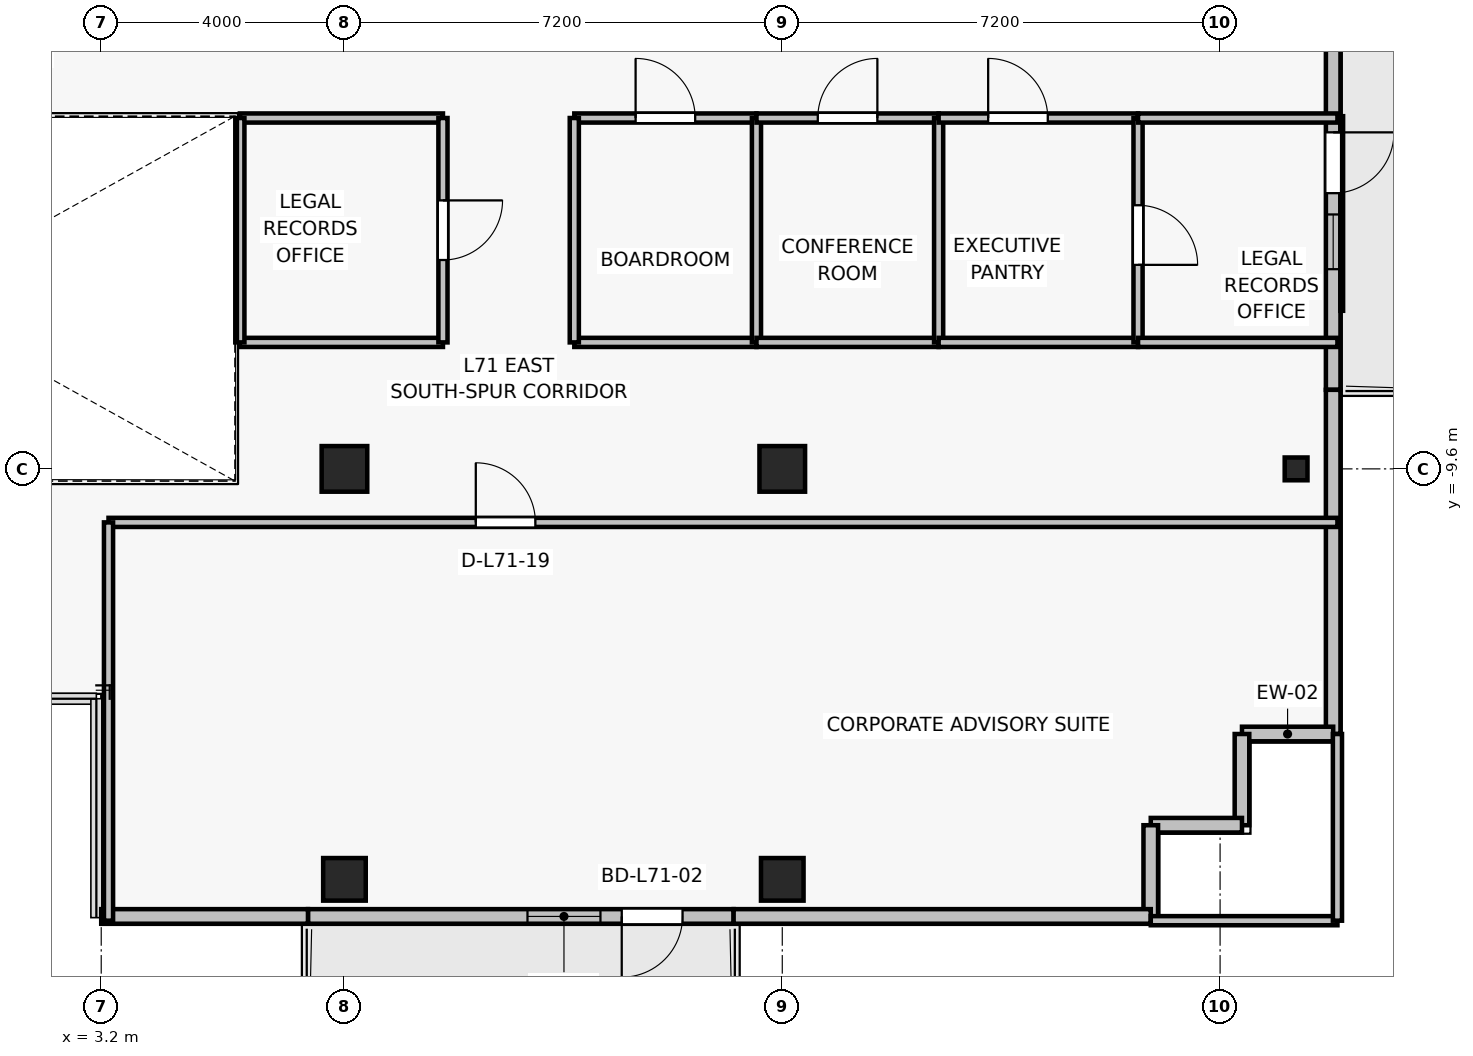
"""IFC4 building model, lengths in metres.
Left out: names, types, materials, properties, quantities, classifications, styles, units other than length and angle.
Written with IfcOpenShell. Run it as: python <this file> out.ifc"""

import sys

from ifc_helpers import new_model, si_unit, direction, frame, frame_2d, origin, origin_2d, place, context, subcontext, project, spatial, rectangle, i_section, extrude, source, transform, mapped, element, fill, save


model = new_model("IFC4")
c1 = context("Model", 3, precision=1e-05, world=origin(), true_north=direction((0.0, 1.0)))
c2 = subcontext(c1, "Body", "Model", "MODEL_VIEW")
j1 = project(units=[si_unit("LENGTHUNIT", "METRE"), si_unit("PLANEANGLEUNIT", "RADIAN")], contexts=[c1])
p1 = place(None, origin())
s1 = spatial("IfcSite", under=j1, at=p1, CompositionType="ELEMENT")
p2 = place(p1, origin())
s2 = spatial("IfcBuilding", under=s1, at=p2, CompositionType="ELEMENT")
p3 = place(p2, frame((0.0, 0.0, 251.8)))
s3 = spatial("IfcBuildingStorey", under=s2, at=p3, CompositionType="ELEMENT", Elevation=251.8)
for number, where, z_axis, x_axis in (
    (1, (7.2, -9.6, 0.0), (0.0, 0.0, 1.0), (1.0, 0.0, 0.0)),
    (2, (14.4, -9.6, 0.0), (0.0, 0.0, 1.0), (1.0, 0.0, 0.0)),
):
    element("IfcColumn", number, at=place(p3, frame(where, z_axis=z_axis, x_axis=x_axis)), inside=s3, PredefinedType="COLUMN", context=c2, shape_type="SweptSolid", body=[
        extrude(rectangle(XDim=0.75, YDim=0.75, at=origin_2d()), origin(), (0.0, 0.0, 1.0), 3.3),
    ])
for number, where, z_axis, x_axis in (
    (3, (7.2, -16.35, 0.0), (0.0, 0.0, 1.0), (1.0, 0.0, 0.0)),
    (4, (14.4, -16.35, 0.0), (0.0, 0.0, 1.0), (1.0, 0.0, 0.0)),
):
    element("IfcColumn", number, at=place(p3, frame(where, z_axis=z_axis, x_axis=x_axis)), inside=s3, PredefinedType="COLUMN", context=c2, shape_type="SweptSolid", body=[
        extrude(rectangle(XDim=0.7, YDim=0.7, at=origin_2d()), origin(), (0.0, 0.0, 1.0), 3.3),
    ])
p4 = place(p3, frame((22.85, -9.6, 0.0), z_axis=(0.0, 0.0, 1.0), x_axis=(1.0, 0.0, 0.0)))
e5 = element("IfcColumn", 5, at=p4, inside=s3, PredefinedType="COLUMN", context=c2, shape_type="SweptSolid", body=[
    extrude(i_section(OverallWidth=0.375, OverallDepth=0.375, WebThickness=0.017, FlangeThickness=0.027, FilletRadius=0.015, at=origin_2d()), origin(), (0.0, 0.0, 1.0), 3.3),
])
p5 = place(p3, frame((13.6, -16.96, 0.0), z_axis=(0.0, 0.0, 1.0), x_axis=(-1.0, 0.0, 0.0)))
e6 = element("IfcWall", 6, at=p5, inside=s3, PredefinedType="SOLIDWALL", context=c2, shape_type="SweptSolid", body=[
    extrude(rectangle(XDim=7.0, YDim=0.24, at=frame_2d((3.5, 0.0))), origin(), (0.0, 0.0, 1.0), 2.665),
])
p6 = place(p5, frame((0.84, 0.0, 0.0)))
e7 = element("IfcOpeningElement", 7, at=p6, cuts=e6, PredefinedType="OPENING", context=c2, shape_type="SweptSolid", body=[
    extrude(rectangle(XDim=1.0, YDim=2.2, at=frame_2d((0.5, 1.1))), frame((0.0, 0.13, 0.0), z_axis=(0.0, -1.0, 0.0), x_axis=(1.0, 0.0, 0.0)), (0.0, 0.0, 1.0), 0.26),
])
p7 = place(p5, frame((2.19, 0.0, 0.85)))
e8 = element("IfcOpeningElement", 8, at=p7, cuts=e6, PredefinedType="OPENING", context=c2, shape_type="SweptSolid", body=[
    extrude(rectangle(XDim=1.2, YDim=1.5, at=frame_2d((0.6, 0.75))), frame((0.0, 0.13, 0.0), z_axis=(0.0, -1.0, 0.0), x_axis=(1.0, 0.0, 0.0)), (0.0, 0.0, 1.0), 0.26),
])
p8 = place(p3, frame((23.46, -2.5, 0.0), z_axis=(0.0, 0.0, 1.0), x_axis=(0.0, -1.0, 0.0)))
e9 = element("IfcWall", 9, at=p8, inside=s3, PredefinedType="SOLIDWALL", context=c2, shape_type="SweptSolid", body=[
    extrude(rectangle(XDim=5.8, YDim=0.24, at=frame_2d((2.9, 0.0))), origin(), (0.0, 0.0, 1.0), 3.075),
])
p9 = place(p8, frame((1.566, 0.0, 0.0)))
e10 = element("IfcOpeningElement", 10, at=p9, cuts=e9, PredefinedType="OPENING", context=c2, shape_type="SweptSolid", body=[
    extrude(rectangle(XDim=1.0, YDim=2.2, at=frame_2d((0.5, 1.1))), frame((0.0, 0.13, 0.0), z_axis=(0.0, -1.0, 0.0), x_axis=(1.0, 0.0, 0.0)), (0.0, 0.0, 1.0), 0.26),
])
p10 = place(p8, frame((2.916, 0.0, 0.85)))
e11 = element("IfcOpeningElement", 11, at=p10, cuts=e9, PredefinedType="OPENING", context=c2, shape_type="SweptSolid", body=[
    extrude(rectangle(XDim=0.9, YDim=1.35, at=frame_2d((0.45, 0.675))), frame((0.0, 0.13, 0.0), z_axis=(0.0, -1.0, 0.0), x_axis=(1.0, 0.0, 0.0)), (0.0, 0.0, 1.0), 0.26),
])
p11 = place(p3, frame((23.46, -13.96, 0.0), z_axis=(0.0, 0.0, 1.0), x_axis=(0.0, 1.0, 0.0)))
e12 = element("IfcWall", 12, at=p11, inside=s3, PredefinedType="SOLIDWALL", context=c2, shape_type="SweptSolid", body=[
    extrude(rectangle(XDim=5.66, YDim=0.24, at=frame_2d((2.83, 0.0))), origin(), (0.0, 0.0, 1.0), 3.075),
])
for number, where, z_axis, x_axis in (
    (13, (21.96, -13.96, 0.0), (0.0, 0.0, 1.0), (1.0, 0.0, 0.0)),
    (14, (21.96, -15.46, 0.0), (0.0, 0.0, 1.0), (0.0, 1.0, 0.0)),
    (15, (20.46, -15.46, 0.0), (0.0, 0.0, 1.0), (1.0, 0.0, 0.0)),
    (16, (20.46, -16.96, 0.0), (0.0, 0.0, 1.0), (0.0, 1.0, 0.0)),
):
    element("IfcWall", number, at=place(p3, frame(where, z_axis=z_axis, x_axis=x_axis)), inside=s3, PredefinedType="SOLIDWALL", context=c2, shape_type="SweptSolid", body=[
        extrude(rectangle(XDim=1.5, YDim=0.24, at=frame_2d((0.75, 0.0))), origin(), (0.0, 0.0, 1.0), 3.075),
    ])
p12 = place(p3, frame((13.6, -16.96, 0.0), z_axis=(0.0, 0.0, 1.0), x_axis=(1.0, 0.0, 0.0)))
e17 = element("IfcWall", 17, at=p12, inside=s3, PredefinedType="SOLIDWALL", context=c2, shape_type="SweptSolid", body=[
    extrude(rectangle(XDim=6.86, YDim=0.24, at=frame_2d((3.43, 0.0))), origin(), (0.0, 0.0, 1.0), 2.665),
])
p13 = place(p3, frame((3.2, -16.96, 0.0), z_axis=(0.0, 0.0, 1.0), x_axis=(1.0, 0.0, 0.0)))
e18 = element("IfcWall", 18, at=p13, inside=s3, PredefinedType="SOLIDWALL", context=c2, shape_type="SweptSolid", body=[
    extrude(rectangle(XDim=3.4, YDim=0.24, at=frame_2d((1.7, 0.0))), origin(), (0.0, 0.0, 1.0), 3.075),
])
p14 = place(p3, frame((13.976, -7.52, 0.0), z_axis=(0.0, 0.0, 1.0), x_axis=(-1.0, 0.0, 0.0)))
e19 = element("IfcWall", 19, at=p14, inside=s3, PredefinedType="PARTITIONING", context=c2, shape_type="SweptSolid", body=[
    extrude(rectangle(XDim=2.996, YDim=0.15, at=frame_2d((1.498, 0.0))), origin(), (0.0, 0.0, 1.0), 3.075),
])
p15 = place(p3, frame((10.98, -3.83, 0.0), z_axis=(0.0, 0.0, 1.0), x_axis=(1.0, 0.0, 0.0)))
e20 = element("IfcWall", 20, at=p15, inside=s3, PredefinedType="PARTITIONING", context=c2, shape_type="SweptSolid", body=[
    extrude(rectangle(XDim=2.996, YDim=0.15, at=frame_2d((1.498, 0.0))), origin(), (0.0, 0.0, 1.0), 3.075),
])
p16 = place(p15, frame((1.008, 0.0, 0.0)))
e21 = element("IfcOpeningElement", 21, at=p16, cuts=e20, PredefinedType="OPENING", context=c2, shape_type="SweptSolid", body=[
    extrude(rectangle(XDim=0.98, YDim=2.15, at=frame_2d((0.49, 1.075))), frame((0.0, 0.085, 0.0), z_axis=(0.0, -1.0, 0.0), x_axis=(1.0, 0.0, 0.0)), (0.0, 0.0, 1.0), 0.17),
])
for number, where, z_axis, x_axis in (
    (22, (10.98, -7.52, 0.0), (0.0, 0.0, 1.0), (0.0, 1.0, 0.0)),
    (23, (13.976, -3.83, 0.0), (0.0, 0.0, 1.0), (0.0, -1.0, 0.0)),
):
    element("IfcWall", number, at=place(p3, frame(where, z_axis=z_axis, x_axis=x_axis)), inside=s3, PredefinedType="PARTITIONING", context=c2, shape_type="SweptSolid", body=[
        extrude(rectangle(XDim=3.69, YDim=0.15, at=frame_2d((1.845, 0.0))), origin(), (0.0, 0.0, 1.0), 2.705),
    ])
p17 = place(p3, frame((16.971, -7.52, 0.0), z_axis=(0.0, 0.0, 1.0), x_axis=(-1.0, 0.0, 0.0)))
e24 = element("IfcWall", 24, at=p17, inside=s3, PredefinedType="PARTITIONING", context=c2, shape_type="SweptSolid", body=[
    extrude(rectangle(XDim=2.996, YDim=0.15, at=frame_2d((1.498, 0.0))), origin(), (0.0, 0.0, 1.0), 2.615),
])
p18 = place(p3, frame((13.976, -3.83, 0.0), z_axis=(0.0, 0.0, 1.0), x_axis=(1.0, 0.0, 0.0)))
e25 = element("IfcWall", 25, at=p18, inside=s3, PredefinedType="PARTITIONING", context=c2, shape_type="SweptSolid", body=[
    extrude(rectangle(XDim=2.996, YDim=0.15, at=frame_2d((1.498, 0.0))), origin(), (0.0, 0.0, 1.0), 2.615),
])
p19 = place(p18, frame((1.008, 0.0, 0.0)))
e26 = element("IfcOpeningElement", 26, at=p19, cuts=e25, PredefinedType="OPENING", context=c2, shape_type="SweptSolid", body=[
    extrude(rectangle(XDim=0.98, YDim=2.15, at=frame_2d((0.49, 1.075))), frame((0.0, 0.085, 0.0), z_axis=(0.0, -1.0, 0.0), x_axis=(1.0, 0.0, 0.0)), (0.0, 0.0, 1.0), 0.17),
])
p20 = place(p3, frame((16.971, -3.83, 0.0), z_axis=(0.0, 0.0, 1.0), x_axis=(0.0, -1.0, 0.0)))
e27 = element("IfcWall", 27, at=p20, inside=s3, PredefinedType="PARTITIONING", context=c2, shape_type="SweptSolid", body=[
    extrude(rectangle(XDim=3.69, YDim=0.15, at=frame_2d((1.845, 0.0))), origin(), (0.0, 0.0, 1.0), 2.705),
])
p21 = place(p3, frame((20.251, -7.52, 0.0), z_axis=(0.0, 0.0, 1.0), x_axis=(-1.0, 0.0, 0.0)))
e28 = element("IfcWall", 28, at=p21, inside=s3, PredefinedType="PARTITIONING", context=c2, shape_type="SweptSolid", body=[
    extrude(rectangle(XDim=3.279, YDim=0.15, at=frame_2d((1.64, 0.0))), origin(), (0.0, 0.0, 1.0), 3.075),
])
p22 = place(p3, frame((16.971, -3.83, 0.0), z_axis=(0.0, 0.0, 1.0), x_axis=(1.0, 0.0, 0.0)))
e29 = element("IfcWall", 29, at=p22, inside=s3, PredefinedType="PARTITIONING", context=c2, shape_type="SweptSolid", body=[
    extrude(rectangle(XDim=3.279, YDim=0.15, at=frame_2d((1.64, 0.0))), origin(), (0.0, 0.0, 1.0), 3.075),
])
p23 = place(p22, frame((0.815, 0.0, 0.0)))
e30 = element("IfcOpeningElement", 30, at=p23, cuts=e29, PredefinedType="OPENING", context=c2, shape_type="SweptSolid", body=[
    extrude(rectangle(XDim=0.98, YDim=2.15, at=frame_2d((0.49, 1.075))), frame((0.0, 0.085, 0.0), z_axis=(0.0, -1.0, 0.0), x_axis=(1.0, 0.0, 0.0)), (0.0, 0.0, 1.0), 0.17),
])
p24 = place(p3, frame((20.251, -3.83, 0.0), z_axis=(0.0, 0.0, 1.0), x_axis=(0.0, -1.0, 0.0)))
e31 = element("IfcWall", 31, at=p24, inside=s3, PredefinedType="PARTITIONING", context=c2, shape_type="SweptSolid", body=[
    extrude(rectangle(XDim=3.69, YDim=0.15, at=frame_2d((1.845, 0.0))), origin(), (0.0, 0.0, 1.0), 2.705),
])
p25 = place(p24, frame((1.435, 0.0, 0.0)))
e32 = element("IfcOpeningElement", 32, at=p25, cuts=e31, PredefinedType="OPENING", context=c2, shape_type="SweptSolid", body=[
    extrude(rectangle(XDim=0.98, YDim=2.15, at=frame_2d((0.49, 1.075))), frame((0.0, 0.085, 0.0), z_axis=(0.0, -1.0, 0.0), x_axis=(1.0, 0.0, 0.0)), (0.0, 0.0, 1.0), 0.17),
])
for number, where, z_axis, x_axis in (
    (33, (23.53, -7.52, 0.0), (0.0, 0.0, 1.0), (-1.0, 0.0, 0.0)),
    (34, (20.251, -3.83, 0.0), (0.0, 0.0, 1.0), (1.0, 0.0, 0.0)),
):
    element("IfcWall", number, at=place(p3, frame(where, z_axis=z_axis, x_axis=x_axis)), inside=s3, PredefinedType="PARTITIONING", context=c2, shape_type="SweptSolid", body=[
        extrude(rectangle(XDim=3.279, YDim=0.15, at=frame_2d((1.64, 0.0))), origin(), (0.0, 0.0, 1.0), 2.765),
    ])
p26 = place(p3, frame((23.53, -17.03, 0.0), z_axis=(0.0, 0.0, 1.0), x_axis=(-1.0, 0.0, 0.0)))
e35 = element("IfcWall", 35, at=p26, inside=s3, PredefinedType="PARTITIONING", context=c2, shape_type="SweptSolid", body=[
    extrude(rectangle(XDim=3.07, YDim=0.15, at=frame_2d((1.535, 0.0))), origin(), (0.0, 0.0, 1.0), 2.665),
])
p27 = place(p3, frame((3.32, -10.48, 0.0), z_axis=(0.0, 0.0, 1.0), x_axis=(1.0, 0.0, 0.0)))
e36 = element("IfcWall", 36, at=p27, inside=s3, PredefinedType="PARTITIONING", context=c2, shape_type="SweptSolid", body=[
    extrude(rectangle(XDim=20.21, YDim=0.15, at=frame_2d((10.105, 0.0))), origin(), (0.0, 0.0, 1.0), 2.615),
])
p28 = place(p27, frame((6.04, 0.0, 0.0)))
e37 = element("IfcOpeningElement", 37, at=p28, cuts=e36, PredefinedType="OPENING", context=c2, shape_type="SweptSolid", body=[
    extrude(rectangle(XDim=0.98, YDim=2.15, at=frame_2d((0.49, 1.075))), frame((0.0, 0.085, 0.0), z_axis=(0.0, -1.0, 0.0), x_axis=(1.0, 0.0, 0.0)), (0.0, 0.0, 1.0), 0.17),
])
p29 = place(p3, frame((3.32, -17.03, 0.0), z_axis=(0.0, 0.0, 1.0), x_axis=(0.0, 1.0, 0.0)))
e38 = element("IfcWall", 38, at=p29, inside=s3, PredefinedType="PARTITIONING", context=c2, shape_type="SweptSolid", body=[
    extrude(rectangle(XDim=6.55, YDim=0.15, at=frame_2d((3.275, 0.0))), origin(), (0.0, 0.0, 1.0), 2.615),
])
p30 = place(p3, frame((23.53, -13.96, 0.0), z_axis=(0.0, 0.0, 1.0), x_axis=(0.0, -1.0, 0.0)))
e39 = element("IfcWall", 39, at=p30, inside=s3, PredefinedType="PARTITIONING", context=c2, shape_type="SweptSolid", body=[
    extrude(rectangle(XDim=3.07, YDim=0.15, at=frame_2d((1.535, 0.0))), origin(), (0.0, 0.0, 1.0), 3.075),
])
for number, where, z_axis, x_axis in (
    (40, (8.82, -7.52, 0.0), (0.0, 0.0, 1.0), (-1.0, 0.0, 0.0)),
    (41, (5.48, -3.83, 0.0), (0.0, 0.0, 1.0), (1.0, 0.0, 0.0)),
):
    element("IfcWall", number, at=place(p3, frame(where, z_axis=z_axis, x_axis=x_axis)), inside=s3, PredefinedType="PARTITIONING", context=c2, shape_type="SweptSolid", body=[
        extrude(rectangle(XDim=3.34, YDim=0.15, at=frame_2d((1.67, 0.0))), origin(), (0.0, 0.0, 1.0), 2.615),
    ])
p31 = place(p3, frame((5.48, -7.52, 0.0), z_axis=(0.0, 0.0, 1.0), x_axis=(0.0, 1.0, 0.0)))
e42 = element("IfcWall", 42, at=p31, inside=s3, PredefinedType="PARTITIONING", context=c2, shape_type="SweptSolid", body=[
    extrude(rectangle(XDim=3.69, YDim=0.15, at=frame_2d((1.845, 0.0))), origin(), (0.0, 0.0, 1.0), 3.075),
])
p32 = place(p3, frame((8.82, -3.83, 0.0), z_axis=(0.0, 0.0, 1.0), x_axis=(0.0, -1.0, 0.0)))
e43 = element("IfcWall", 43, at=p32, inside=s3, PredefinedType="PARTITIONING", context=c2, shape_type="SweptSolid", body=[
    extrude(rectangle(XDim=3.69, YDim=0.15, at=frame_2d((1.845, 0.0))), origin(), (0.0, 0.0, 1.0), 2.705),
])
p33 = place(p32, frame((1.355, 0.0, 0.0)))
e44 = element("IfcOpeningElement", 44, at=p33, cuts=e43, PredefinedType="OPENING", context=c2, shape_type="SweptSolid", body=[
    extrude(rectangle(XDim=0.98, YDim=2.15, at=frame_2d((0.49, 1.075))), frame((0.0, 0.085, 0.0), z_axis=(0.0, -1.0, 0.0), x_axis=(1.0, 0.0, 0.0)), (0.0, 0.0, 1.0), 0.17),
])
m1 = source(origin(), c2, "Body", "SweptSolid", [
    extrude(rectangle(XDim=1.0, YDim=2.2, at=frame_2d((0.5, 1.1))), frame((0.0, 0.025, 0.0), z_axis=(0.0, -1.0, 0.0), x_axis=(1.0, 0.0, 0.0)), (0.0, 0.0, 1.0), 0.05),
])
p34 = place(p6, origin())
e45 = element("IfcDoor", 45, at=p34, inside=s3, OperationType="SINGLE_SWING_RIGHT", PredefinedType="DOOR", context=c2, shape_type="MappedRepresentation", body=[
    mapped(m1, transform((0.0, 0.0, 0.0), x_axis=(1.0, 0.0, 0.0), y_axis=(0.0, 1.0, 0.0), z_axis=(0.0, 0.0, 1.0), scale=1.0)),
])
fill(e7, e45)
m2 = source(origin(), c2, "Body", "SweptSolid", [
    extrude(rectangle(XDim=1.2, YDim=1.5, at=frame_2d((0.6, 0.75))), frame((0.0, 0.03, 0.0), z_axis=(0.0, -1.0, 0.0), x_axis=(1.0, 0.0, 0.0)), (0.0, 0.0, 1.0), 0.06),
])
p35 = place(p7, origin())
e46 = element("IfcWindow", 46, at=p35, inside=s3, PartitioningType="SINGLE_PANEL", PredefinedType="WINDOW", context=c2, shape_type="MappedRepresentation", body=[
    mapped(m2, transform((0.0, 0.0, 0.0), x_axis=(1.0, 0.0, 0.0), y_axis=(0.0, 1.0, 0.0), z_axis=(0.0, 0.0, 1.0), scale=1.0)),
])
fill(e8, e46)
p36 = place(p9, origin())
e47 = element("IfcDoor", 47, at=p36, inside=s3, OperationType="SINGLE_SWING_LEFT", PredefinedType="DOOR", context=c2, shape_type="MappedRepresentation", body=[
    mapped(m1, transform((0.0, 0.0, 0.0), x_axis=(1.0, 0.0, 0.0), y_axis=(0.0, 1.0, 0.0), z_axis=(0.0, 0.0, 1.0), scale=1.0)),
])
fill(e10, e47)
m3 = source(origin(), c2, "Body", "SweptSolid", [
    extrude(rectangle(XDim=0.9, YDim=1.35, at=frame_2d((0.45, 0.675))), frame((0.0, 0.03, 0.0), z_axis=(0.0, -1.0, 0.0), x_axis=(1.0, 0.0, 0.0)), (0.0, 0.0, 1.0), 0.06),
])
p37 = place(p10, origin())
e48 = element("IfcWindow", 48, at=p37, inside=s3, PartitioningType="SINGLE_PANEL", PredefinedType="WINDOW", context=c2, shape_type="MappedRepresentation", body=[
    mapped(m3, transform((0.0, 0.0, 0.0), x_axis=(1.0, 0.0, 0.0), y_axis=(0.0, 1.0, 0.0), z_axis=(0.0, 0.0, 1.0), scale=1.0)),
])
fill(e11, e48)
m4 = source(origin(), c2, "Body", "SweptSolid", [
    extrude(rectangle(XDim=0.98, YDim=2.15, at=frame_2d((0.49, 1.075))), frame((0.0, 0.025, 0.0), z_axis=(0.0, -1.0, 0.0), x_axis=(1.0, 0.0, 0.0)), (0.0, 0.0, 1.0), 0.05),
])
p38 = place(p16, origin())
e49 = element("IfcDoor", 49, at=p38, inside=s3, OperationType="SINGLE_SWING_LEFT", PredefinedType="DOOR", context=c2, shape_type="MappedRepresentation", body=[
    mapped(m4, transform((0.0, 0.0, 0.0), x_axis=(1.0, 0.0, 0.0), y_axis=(0.0, 1.0, 0.0), z_axis=(0.0, 0.0, 1.0), scale=1.0)),
])
fill(e21, e49)
p39 = place(p19, origin())
e50 = element("IfcDoor", 50, at=p39, inside=s3, OperationType="SINGLE_SWING_RIGHT", PredefinedType="DOOR", context=c2, shape_type="MappedRepresentation", body=[
    mapped(m4, transform((0.0, 0.0, 0.0), x_axis=(1.0, 0.0, 0.0), y_axis=(0.0, 1.0, 0.0), z_axis=(0.0, 0.0, 1.0), scale=1.0)),
])
fill(e26, e50)
p40 = place(p23, origin())
e51 = element("IfcDoor", 51, at=p40, inside=s3, OperationType="SINGLE_SWING_LEFT", PredefinedType="DOOR", context=c2, shape_type="MappedRepresentation", body=[
    mapped(m4, transform((0.0, 0.0, 0.0), x_axis=(1.0, 0.0, 0.0), y_axis=(0.0, 1.0, 0.0), z_axis=(0.0, 0.0, 1.0), scale=1.0)),
])
fill(e30, e51)
p41 = place(p25, origin())
e52 = element("IfcDoor", 52, at=p41, inside=s3, OperationType="SINGLE_SWING_RIGHT", PredefinedType="DOOR", context=c2, shape_type="MappedRepresentation", body=[
    mapped(m4, transform((0.0, 0.0, 0.0), x_axis=(1.0, 0.0, 0.0), y_axis=(0.0, 1.0, 0.0), z_axis=(0.0, 0.0, 1.0), scale=1.0)),
])
fill(e32, e52)
p42 = place(p28, origin())
e53 = element("IfcDoor", 53, at=p42, inside=s3, OperationType="SINGLE_SWING_LEFT", PredefinedType="DOOR", context=c2, shape_type="MappedRepresentation", body=[
    mapped(m4, transform((0.0, 0.0, 0.0), x_axis=(1.0, 0.0, 0.0), y_axis=(0.0, 1.0, 0.0), z_axis=(0.0, 0.0, 1.0), scale=1.0)),
])
fill(e37, e53)
p43 = place(p33, origin())
e54 = element("IfcDoor", 54, at=p43, inside=s3, OperationType="SINGLE_SWING_LEFT", PredefinedType="DOOR", context=c2, shape_type="MappedRepresentation", body=[
    mapped(m4, transform((0.0, 0.0, 0.0), x_axis=(1.0, 0.0, 0.0), y_axis=(0.0, 1.0, 0.0), z_axis=(0.0, 0.0, 1.0), scale=1.0)),
])
fill(e44, e54)
save(model, sys.argv[1])
